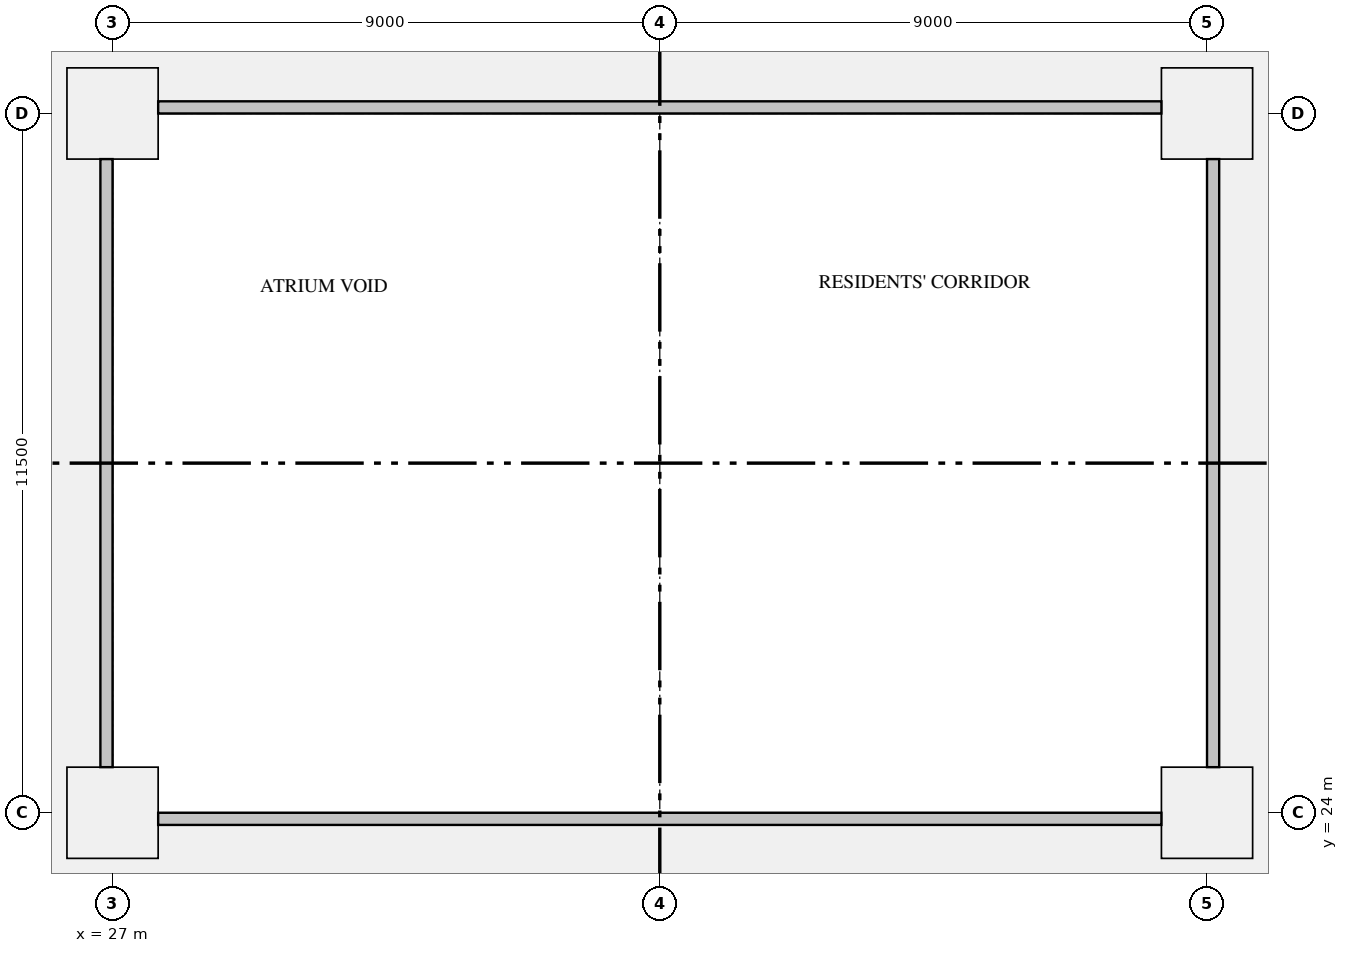
"""IFC4 building model, lengths in metres.
Left out: names, types, materials, properties, quantities, classifications, styles, units other than length and angle.
Written with IfcOpenShell. Run it as: python <this file> out.ifc"""

import sys

from ifc_helpers import new_model, si_unit, direction, frame, origin, origin_2d, place, context, subcontext, project, spatial, rectangle, extrude, element, save


model = new_model("IFC4")
c1 = context("Model", 3, precision=1e-05, world=origin(), true_north=direction((0.0, 1.0)))
c2 = subcontext(c1, "Body", "Model", "MODEL_VIEW")
j1 = project(units=[si_unit("LENGTHUNIT", "METRE"), si_unit("PLANEANGLEUNIT", "RADIAN")], contexts=[c1])
p1 = place(None, origin())
s1 = spatial("IfcSite", under=j1, at=p1, CompositionType="ELEMENT")
p2 = place(p1, origin())
s2 = spatial("IfcBuilding", under=s1, at=p2, CompositionType="ELEMENT")
p3 = place(p2, frame((0.0, 0.0, 60.45)))
s3 = spatial("IfcBuildingStorey", under=s2, at=p3, CompositionType="ELEMENT", Elevation=60.45)
for number, where, z_axis, x_axis in (
    (1, (27.0, 24.0, 0.0), (0.0, 0.0, 1.0), (1.0, 0.0, 0.0)),
    (2, (45.0, 24.0, 0.0), (0.0, 0.0, 1.0), (1.0, 0.0, 0.0)),
    (3, (27.0, 35.5, 0.0), (0.0, 0.0, 1.0), (1.0, 0.0, 0.0)),
    (4, (45.0, 35.5, 0.0), (0.0, 0.0, 1.0), (1.0, 0.0, 0.0)),
):
    element("IfcColumn", number, at=place(p3, frame(where, z_axis=z_axis, x_axis=x_axis)), inside=s3, PredefinedType="COLUMN", context=c2, shape_type="SweptSolid", body=[
        extrude(rectangle(XDim=1.5, YDim=1.5, at=origin_2d()), origin(), (0.0, 0.0, 1.0), 3.15),
    ])
save(model, sys.argv[1])
